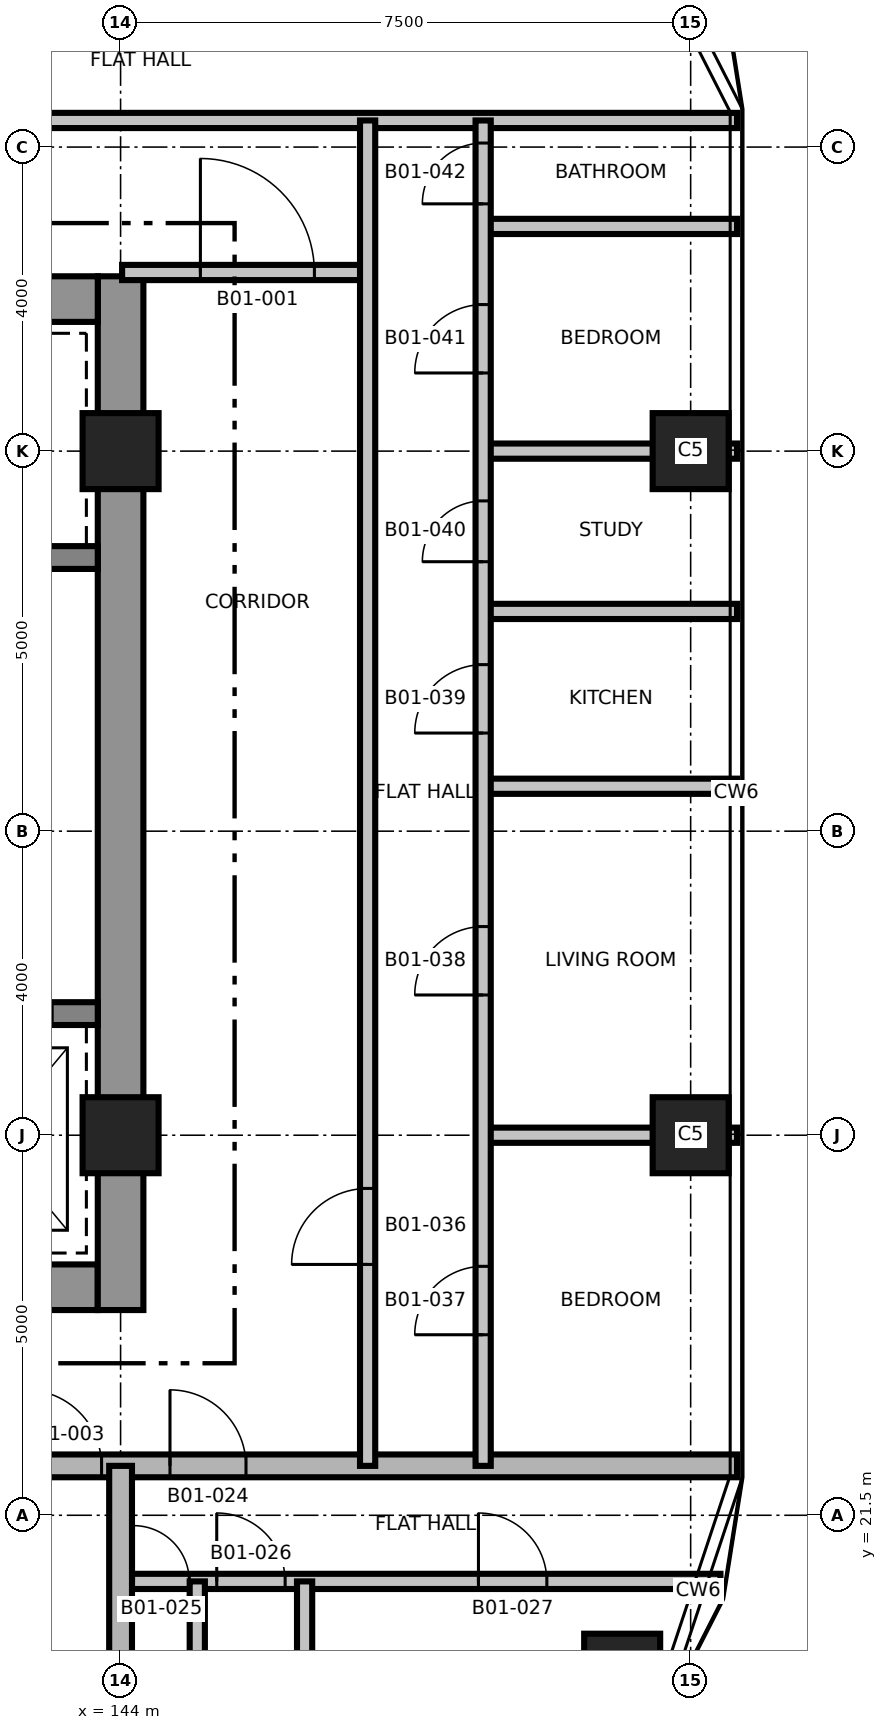
"""IFC4 building model, lengths in metres.
Left out: names, types, materials, properties, quantities, classifications, styles, units other than length and angle.
Written with IfcOpenShell. Run it as: python <this file> out.ifc"""

import sys

from ifc_helpers import new_model, si_unit, direction, frame, frame_2d, origin, origin_2d, place, context, subcontext, project, spatial, rectangle, extrude, element, fill, save


model = new_model("IFC4")
c1 = context("Model", 3, precision=1e-05, world=origin(), true_north=direction((0.0, 1.0)))
c2 = subcontext(c1, "Body", "Model", "MODEL_VIEW")
j1 = project(units=[si_unit("LENGTHUNIT", "METRE"), si_unit("PLANEANGLEUNIT", "RADIAN")], contexts=[c1])
p1 = place(None, origin())
s1 = spatial("IfcSite", under=j1, at=p1, CompositionType="ELEMENT")
p2 = place(p1, origin())
s2 = spatial("IfcBuilding", under=s1, at=p2, CompositionType="ELEMENT")
p3 = place(p2, frame((0.0, 0.0, 33.5)))
s3 = spatial("IfcBuildingStorey", under=s2, at=p3, CompositionType="ELEMENT", Elevation=33.5)
p4 = place(p3, frame((128.7, 24.5, 0.0), z_axis=(0.0, 0.0, 1.0), x_axis=(1.0, 0.0, 0.0)))
e1 = element("IfcWall", 1, at=p4, inside=s3, PredefinedType="SHEAR", context=c2, shape_type="SweptSolid", body=[
    extrude(rectangle(XDim=15.0, YDim=0.6, at=frame_2d((7.5, 0.0))), origin(), (0.0, 0.0, 1.0), 3.7),
])
p5 = place(p4, frame((9.65, 0.0, 0.0)))
e2 = element("IfcOpeningElement", 2, at=p5, cuts=e1, PredefinedType="OPENING", context=c2, shape_type="SweptSolid", body=[
    extrude(rectangle(XDim=1.5, YDim=2.1, at=frame_2d((0.75, 1.05))), frame((0.0, 0.31, 0.0), z_axis=(0.0, -1.0, 0.0), x_axis=(1.0, 0.0, 0.0)), (0.0, 0.0, 1.0), 0.62),
])
p6 = place(p4, frame((1.25, 0.0, 0.0)))
e3 = element("IfcOpeningElement", 3, at=p6, cuts=e1, PredefinedType="OPENING", context=c2, shape_type="SweptSolid", body=[
    extrude(rectangle(XDim=0.9, YDim=2.1, at=frame_2d((0.45, 1.05))), frame((0.0, 0.31, 0.0), z_axis=(0.0, -1.0, 0.0), x_axis=(1.0, 0.0, 0.0)), (0.0, 0.0, 1.0), 0.62),
])
p7 = place(p3, frame((144.0, 24.2, 0.0), z_axis=(0.0, 0.0, 1.0), x_axis=(0.0, 1.0, 0.0)))
e4 = element("IfcWall", 4, at=p7, inside=s3, PredefinedType="SHEAR", context=c2, shape_type="SweptSolid", body=[
    extrude(rectangle(XDim=13.6, YDim=0.6, at=frame_2d((6.8, 0.0))), origin(), (0.0, 0.0, 1.0), 3.7),
])
p8 = place(p3, frame((128.7, 37.5, 0.0), z_axis=(0.0, 0.0, 1.0), x_axis=(1.0, 0.0, 0.0)))
e5 = element("IfcWall", 5, at=p8, inside=s3, PredefinedType="SHEAR", context=c2, shape_type="SweptSolid", body=[
    extrude(rectangle(XDim=15.0, YDim=0.6, at=frame_2d((7.5, 0.0))), origin(), (0.0, 0.0, 1.0), 3.7),
])
p9 = place(p8, frame((9.65, 0.0, 0.0)))
e6 = element("IfcOpeningElement", 6, at=p9, cuts=e5, PredefinedType="OPENING", context=c2, shape_type="SweptSolid", body=[
    extrude(rectangle(XDim=1.5, YDim=2.1, at=frame_2d((0.75, 1.05))), frame((0.0, 0.31, 0.0), z_axis=(0.0, -1.0, 0.0), x_axis=(1.0, 0.0, 0.0)), (0.0, 0.0, 1.0), 0.62),
])
p10 = place(p8, frame((12.85, 0.0, 0.0)))
e7 = element("IfcOpeningElement", 7, at=p10, cuts=e5, PredefinedType="OPENING", context=c2, shape_type="SweptSolid", body=[
    extrude(rectangle(XDim=0.9, YDim=2.1, at=frame_2d((0.45, 1.05))), frame((0.0, 0.31, 0.0), z_axis=(0.0, -1.0, 0.0), x_axis=(1.0, 0.0, 0.0)), (0.0, 0.0, 1.0), 0.62),
])
p11 = place(p8, frame((4.3, 0.0, 0.0)))
e8 = element("IfcOpeningElement", 8, at=p11, cuts=e5, PredefinedType="OPENING", context=c2, shape_type="SweptSolid", body=[
    extrude(rectangle(XDim=0.9, YDim=2.1, at=frame_2d((0.45, 1.05))), frame((0.0, 0.31, 0.0), z_axis=(0.0, -1.0, 0.0), x_axis=(1.0, 0.0, 0.0)), (0.0, 0.0, 1.0), 0.62),
])
p12 = place(p8, frame((7.2, 0.0, 0.0)))
e9 = element("IfcOpeningElement", 9, at=p12, cuts=e5, PredefinedType="OPENING", context=c2, shape_type="SweptSolid", body=[
    extrude(rectangle(XDim=0.9, YDim=2.1, at=frame_2d((0.45, 1.05))), frame((0.0, 0.31, 0.0), z_axis=(0.0, -1.0, 0.0), x_axis=(1.0, 0.0, 0.0)), (0.0, 0.0, 1.0), 0.62),
])
p13 = place(p3, frame((141.05, 28.1, 0.0), z_axis=(0.0, 0.0, 1.0), x_axis=(1.0, 0.0, 0.0)))
e10 = element("IfcWall", 10, at=p13, inside=s3, PredefinedType="SHEAR", context=c2, shape_type="SweptSolid", body=[
    extrude(rectangle(XDim=2.65, YDim=0.3, at=frame_2d((1.325, 0.0))), origin(), (0.0, 0.0, 1.0), 3.7),
])
p14 = place(p13, frame((0.75, 0.0, 0.0)))
e11 = element("IfcOpeningElement", 11, at=p14, cuts=e10, PredefinedType="OPENING", context=c2, shape_type="SweptSolid", body=[
    extrude(rectangle(XDim=1.3, YDim=2.4, at=frame_2d((0.65, 1.2))), frame((0.0, 0.16, 0.0), z_axis=(0.0, -1.0, 0.0), x_axis=(1.0, 0.0, 0.0)), (0.0, 0.0, 1.0), 0.32),
])
p15 = place(p3, frame((141.05, 34.1, 0.0), z_axis=(0.0, 0.0, 1.0), x_axis=(1.0, 0.0, 0.0)))
e12 = element("IfcWall", 12, at=p15, inside=s3, PredefinedType="SHEAR", context=c2, shape_type="SweptSolid", body=[
    extrude(rectangle(XDim=2.65, YDim=0.3, at=frame_2d((1.325, 0.0))), origin(), (0.0, 0.0, 1.0), 3.7),
])
for number, where, z_axis, x_axis in (
    (13, (150.599, 19.442, 0.0), (0.0, 0.0, 1.0), (1.0, 0.0, 0.0)),
    (14, (144.0, 26.5, 0.0), (0.0, 0.0, 1.0), (1.0, 0.0, 0.0)),
    (15, (151.5, 26.5, 0.0), (0.0, 0.0, 1.0), (1.0, 0.0, 0.0)),
    (16, (144.0, 35.5, 0.0), (0.0, 0.0, 1.0), (1.0, 0.0, 0.0)),
    (17, (151.5, 35.5, 0.0), (0.0, 0.0, 1.0), (1.0, 0.0, 0.0)),
):
    element("IfcColumn", number, at=place(p3, frame(where, z_axis=z_axis, x_axis=x_axis)), inside=s3, PredefinedType="COLUMN", context=c2, shape_type="SweptSolid", body=[
        extrude(rectangle(XDim=1.0, YDim=1.0, at=origin_2d()), origin(), (0.0, 0.0, 1.0), 3.7),
    ])
p16 = place(p3, frame((144.0, 20.63, 0.0), z_axis=(0.0, 0.0, 1.0), x_axis=(1.0, 0.0, 0.0)))
e18 = element("IfcWall", 18, at=p16, inside=s3, PredefinedType="PARTITIONING", context=c2, shape_type="SweptSolid", body=[
    extrude(rectangle(XDim=7.892, YDim=0.2, at=frame_2d((3.946, 0.0))), origin(), (0.0, 0.0, 1.0), 3.4),
])
p17 = place(p16, frame((0.17, 0.0, 0.0)))
e19 = element("IfcOpeningElement", 19, at=p17, cuts=e18, PredefinedType="OPENING", context=c2, shape_type="SweptSolid", body=[
    extrude(rectangle(XDim=0.734, YDim=2.1, at=frame_2d((0.367, 1.05))), frame((0.0, 0.11, 0.0), z_axis=(0.0, -1.0, 0.0), x_axis=(1.0, 0.0, 0.0)), (0.0, 0.0, 1.0), 0.22),
])
p18 = place(p16, frame((1.265, 0.0, 0.0)))
e20 = element("IfcOpeningElement", 20, at=p18, cuts=e18, PredefinedType="OPENING", context=c2, shape_type="SweptSolid", body=[
    extrude(rectangle(XDim=0.9, YDim=2.1, at=frame_2d((0.45, 1.05))), frame((0.0, 0.11, 0.0), z_axis=(0.0, -1.0, 0.0), x_axis=(1.0, 0.0, 0.0)), (0.0, 0.0, 1.0), 0.22),
])
p19 = place(p16, frame((4.708, 0.0, 0.0)))
e21 = element("IfcOpeningElement", 21, at=p19, cuts=e18, PredefinedType="OPENING", context=c2, shape_type="SweptSolid", body=[
    extrude(rectangle(XDim=0.9, YDim=2.1, at=frame_2d((0.45, 1.05))), frame((0.0, 0.11, 0.0), z_axis=(0.0, -1.0, 0.0), x_axis=(1.0, 0.0, 0.0)), (0.0, 0.0, 1.0), 0.22),
])
p20 = place(p3, frame((120.89, 22.15, 0.0), z_axis=(0.0, 0.0, 1.0), x_axis=(1.0, 0.0, 0.0)))
e22 = element("IfcWall", 22, at=p20, inside=s3, PredefinedType="SHEAR", context=c2, shape_type="SweptSolid", body=[
    extrude(rectangle(XDim=31.22, YDim=0.3, at=frame_2d((15.61, 0.0))), origin(), (0.0, 0.0, 1.0), 3.4),
])
p21 = place(p20, frame((21.86, 0.0, 0.0)))
e23 = element("IfcOpeningElement", 23, at=p21, cuts=e22, PredefinedType="OPENING", context=c2, shape_type="SweptSolid", body=[
    extrude(rectangle(XDim=1.0, YDim=2.1, at=frame_2d((0.5, 1.05))), frame((0.0, 0.16, 0.0), z_axis=(0.0, -1.0, 0.0), x_axis=(1.0, 0.0, 0.0)), (0.0, 0.0, 1.0), 0.32),
])
p22 = place(p20, frame((6.46, 0.0, 0.0)))
e24 = element("IfcOpeningElement", 24, at=p22, cuts=e22, PredefinedType="OPENING", context=c2, shape_type="SweptSolid", body=[
    extrude(rectangle(XDim=1.0, YDim=2.1, at=frame_2d((0.5, 1.05))), frame((0.0, 0.16, 0.0), z_axis=(0.0, -1.0, 0.0), x_axis=(1.0, 0.0, 0.0)), (0.0, 0.0, 1.0), 0.32),
])
p23 = place(p20, frame((11.36, 0.0, 0.0)))
e25 = element("IfcOpeningElement", 25, at=p23, cuts=e22, PredefinedType="OPENING", context=c2, shape_type="SweptSolid", body=[
    extrude(rectangle(XDim=1.0, YDim=2.1, at=frame_2d((0.5, 1.05))), frame((0.0, 0.16, 0.0), z_axis=(0.0, -1.0, 0.0), x_axis=(1.0, 0.0, 0.0)), (0.0, 0.0, 1.0), 0.32),
])
p24 = place(p20, frame((23.76, 0.0, 0.0)))
e26 = element("IfcOpeningElement", 26, at=p24, cuts=e22, PredefinedType="OPENING", context=c2, shape_type="SweptSolid", body=[
    extrude(rectangle(XDim=1.0, YDim=2.1, at=frame_2d((0.5, 1.05))), frame((0.0, 0.16, 0.0), z_axis=(0.0, -1.0, 0.0), x_axis=(1.0, 0.0, 0.0)), (0.0, 0.0, 1.0), 0.32),
])
p25 = place(p20, frame((15.86, 0.0, 0.0)))
e27 = element("IfcOpeningElement", 27, at=p25, cuts=e22, PredefinedType="OPENING", context=c2, shape_type="SweptSolid", body=[
    extrude(rectangle(XDim=0.9, YDim=2.1, at=frame_2d((0.45, 1.05))), frame((0.0, 0.16, 0.0), z_axis=(0.0, -1.0, 0.0), x_axis=(1.0, 0.0, 0.0)), (0.0, 0.0, 1.0), 0.32),
])
for number, where, z_axis, x_axis in (
    (28, (148.77, 26.5, 0.0), (0.0, 0.0, 1.0), (1.0, 0.0, 0.0)),
    (29, (148.77, 31.091, 0.0), (0.0, 0.0, 1.0), (1.0, 0.0, 0.0)),
    (30, (148.77, 33.391, 0.0), (0.0, 0.0, 1.0), (1.0, 0.0, 0.0)),
    (31, (148.77, 35.5, 0.0), (0.0, 0.0, 1.0), (1.0, 0.0, 0.0)),
):
    element("IfcWall", number, at=place(p3, frame(where, z_axis=z_axis, x_axis=x_axis)), inside=s3, PredefinedType="PARTITIONING", context=c2, shape_type="SweptSolid", body=[
        extrude(rectangle(XDim=3.34, YDim=0.2, at=frame_2d((1.67, 0.0))), origin(), (0.0, 0.0, 1.0), 3.4),
    ])
p26 = place(p3, frame((144.02, 37.85, 0.0), z_axis=(0.0, 0.0, 1.0), x_axis=(1.0, 0.0, 0.0)))
e32 = element("IfcWall", 32, at=p26, inside=s3, PredefinedType="PARTITIONING", context=c2, shape_type="SweptSolid", body=[
    extrude(rectangle(XDim=3.23, YDim=0.2, at=frame_2d((1.615, 0.0))), origin(), (0.0, 0.0, 1.0), 3.4),
])
p27 = place(p26, frame((1.03, 0.0, 0.0)))
e33 = element("IfcOpeningElement", 33, at=p27, cuts=e32, PredefinedType="OPENING", context=c2, shape_type="SweptSolid", body=[
    extrude(rectangle(XDim=1.5, YDim=2.1, at=frame_2d((0.75, 1.05))), frame((0.0, 0.11, 0.0), z_axis=(0.0, -1.0, 0.0), x_axis=(1.0, 0.0, 0.0)), (0.0, 0.0, 1.0), 0.22),
])
p28 = place(p3, frame((148.77, 38.456, 0.0), z_axis=(0.0, 0.0, 1.0), x_axis=(1.0, 0.0, 0.0)))
e34 = element("IfcWall", 34, at=p28, inside=s3, PredefinedType="PARTITIONING", context=c2, shape_type="SweptSolid", body=[
    extrude(rectangle(XDim=3.34, YDim=0.2, at=frame_2d((1.67, 0.0))), origin(), (0.0, 0.0, 1.0), 3.4),
])
p29 = place(p3, frame((120.89, 39.85, 0.0), z_axis=(0.0, 0.0, 1.0), x_axis=(1.0, 0.0, 0.0)))
e35 = element("IfcWall", 35, at=p29, inside=s3, PredefinedType="PARTITIONING", context=c2, shape_type="SweptSolid", body=[
    extrude(rectangle(XDim=31.22, YDim=0.2, at=frame_2d((15.61, 0.0))), origin(), (0.0, 0.0, 1.0), 3.4),
])
p30 = place(p29, frame((10.21, 0.0, 0.0)))
e36 = element("IfcOpeningElement", 36, at=p30, cuts=e35, PredefinedType="OPENING", context=c2, shape_type="SweptSolid", body=[
    extrude(rectangle(XDim=1.0, YDim=2.1, at=frame_2d((0.5, 1.05))), frame((0.0, 0.11, 0.0), z_axis=(0.0, -1.0, 0.0), x_axis=(1.0, 0.0, 0.0)), (0.0, 0.0, 1.0), 0.22),
])
p31 = place(p29, frame((20.01, 0.0, 0.0)))
e37 = element("IfcOpeningElement", 37, at=p31, cuts=e35, PredefinedType="OPENING", context=c2, shape_type="SweptSolid", body=[
    extrude(rectangle(XDim=1.0, YDim=2.1, at=frame_2d((0.5, 1.05))), frame((0.0, 0.11, 0.0), z_axis=(0.0, -1.0, 0.0), x_axis=(1.0, 0.0, 0.0)), (0.0, 0.0, 1.0), 0.22),
])
p32 = place(p3, frame((144.0, 16.89, 0.0), z_axis=(0.0, 0.0, 1.0), x_axis=(0.0, 1.0, 0.0)))
e38 = element("IfcWall", 38, at=p32, inside=s3, PredefinedType="SHEAR", context=c2, shape_type="SweptSolid", body=[
    extrude(rectangle(XDim=5.26, YDim=0.3, at=frame_2d((2.63, 0.0))), origin(), (0.0, 0.0, 1.0), 3.4),
])
for number, where, z_axis, x_axis in (
    (39, (145.009, 16.89, 0.0), (0.0, 0.0, 1.0), (0.0, 1.0, 0.0)),
    (40, (146.421, 16.89, 0.0), (0.0, 0.0, 1.0), (0.0, 1.0, 0.0)),
):
    element("IfcWall", number, at=place(p3, frame(where, z_axis=z_axis, x_axis=x_axis)), inside=s3, PredefinedType="PARTITIONING", context=c2, shape_type="SweptSolid", body=[
        extrude(rectangle(XDim=3.74, YDim=0.2, at=frame_2d((1.87, 0.0))), origin(), (0.0, 0.0, 1.0), 3.4),
    ])
p33 = place(p3, frame((147.25, 22.15, 0.0), z_axis=(0.0, 0.0, 1.0), x_axis=(0.0, 1.0, 0.0)))
e41 = element("IfcWall", 41, at=p33, inside=s3, PredefinedType="PARTITIONING", context=c2, shape_type="SweptSolid", body=[
    extrude(rectangle(XDim=17.7, YDim=0.2, at=frame_2d((8.85, 0.0))), origin(), (0.0, 0.0, 1.0), 3.4),
])
p34 = place(p33, frame((2.65, 0.0, 0.0)))
e42 = element("IfcOpeningElement", 42, at=p34, cuts=e41, PredefinedType="OPENING", context=c2, shape_type="SweptSolid", body=[
    extrude(rectangle(XDim=1.0, YDim=2.1, at=frame_2d((0.5, 1.05))), frame((0.0, 0.11, 0.0), z_axis=(0.0, -1.0, 0.0), x_axis=(1.0, 0.0, 0.0)), (0.0, 0.0, 1.0), 0.22),
])
p35 = place(p3, frame((148.77, 22.15, 0.0), z_axis=(0.0, 0.0, 1.0), x_axis=(0.0, 1.0, 0.0)))
e43 = element("IfcWall", 43, at=p35, inside=s3, PredefinedType="PARTITIONING", context=c2, shape_type="SweptSolid", body=[
    extrude(rectangle(XDim=17.7, YDim=0.2, at=frame_2d((8.85, 0.0))), origin(), (0.0, 0.0, 1.0), 3.4),
])
p36 = place(p35, frame((1.725, 0.0, 0.0)))
e44 = element("IfcOpeningElement", 44, at=p36, cuts=e43, PredefinedType="OPENING", context=c2, shape_type="SweptSolid", body=[
    extrude(rectangle(XDim=0.9, YDim=2.1, at=frame_2d((0.45, 1.05))), frame((0.0, 0.11, 0.0), z_axis=(0.0, -1.0, 0.0), x_axis=(1.0, 0.0, 0.0)), (0.0, 0.0, 1.0), 0.22),
])
p37 = place(p35, frame((6.195, 0.0, 0.0)))
e45 = element("IfcOpeningElement", 45, at=p37, cuts=e43, PredefinedType="OPENING", context=c2, shape_type="SweptSolid", body=[
    extrude(rectangle(XDim=0.9, YDim=2.1, at=frame_2d((0.45, 1.05))), frame((0.0, 0.11, 0.0), z_axis=(0.0, -1.0, 0.0), x_axis=(1.0, 0.0, 0.0)), (0.0, 0.0, 1.0), 0.22),
])
p38 = place(p35, frame((9.641, 0.0, 0.0)))
e46 = element("IfcOpeningElement", 46, at=p38, cuts=e43, PredefinedType="OPENING", context=c2, shape_type="SweptSolid", body=[
    extrude(rectangle(XDim=0.9, YDim=2.1, at=frame_2d((0.45, 1.05))), frame((0.0, 0.11, 0.0), z_axis=(0.0, -1.0, 0.0), x_axis=(1.0, 0.0, 0.0)), (0.0, 0.0, 1.0), 0.22),
])
p39 = place(p35, frame((11.895, 0.0, 0.0)))
e47 = element("IfcOpeningElement", 47, at=p39, cuts=e43, PredefinedType="OPENING", context=c2, shape_type="SweptSolid", body=[
    extrude(rectangle(XDim=0.8, YDim=2.1, at=frame_2d((0.4, 1.05))), frame((0.0, 0.11, 0.0), z_axis=(0.0, -1.0, 0.0), x_axis=(1.0, 0.0, 0.0)), (0.0, 0.0, 1.0), 0.22),
])
p40 = place(p35, frame((14.378, 0.0, 0.0)))
e48 = element("IfcOpeningElement", 48, at=p40, cuts=e43, PredefinedType="OPENING", context=c2, shape_type="SweptSolid", body=[
    extrude(rectangle(XDim=0.9, YDim=2.1, at=frame_2d((0.45, 1.05))), frame((0.0, 0.11, 0.0), z_axis=(0.0, -1.0, 0.0), x_axis=(1.0, 0.0, 0.0)), (0.0, 0.0, 1.0), 0.22),
])
p41 = place(p35, frame((16.603, 0.0, 0.0)))
e49 = element("IfcOpeningElement", 49, at=p41, cuts=e43, PredefinedType="OPENING", context=c2, shape_type="SweptSolid", body=[
    extrude(rectangle(XDim=0.8, YDim=2.1, at=frame_2d((0.4, 1.05))), frame((0.0, 0.11, 0.0), z_axis=(0.0, -1.0, 0.0), x_axis=(1.0, 0.0, 0.0)), (0.0, 0.0, 1.0), 0.22),
])
p42 = place(p27, origin())
e50 = element("IfcDoor", 50, at=p42, inside=s3, OperationType="SINGLE_SWING_LEFT", PredefinedType="DOOR", context=c2, shape_type="SweptSolid", body=[
    extrude(rectangle(XDim=1.5, YDim=2.1, at=frame_2d((0.75, 1.05))), frame((0.0, 0.025, 0.0), z_axis=(0.0, -1.0, 0.0), x_axis=(1.0, 0.0, 0.0)), (0.0, 0.0, 1.0), 0.05),
])
fill(e33, e50)
p43 = place(p21, origin())
e51 = element("IfcDoor", 51, at=p43, inside=s3, OperationType="SINGLE_SWING_LEFT", PredefinedType="DOOR", context=c2, shape_type="SweptSolid", body=[
    extrude(rectangle(XDim=1.0, YDim=2.1, at=frame_2d((0.5, 1.05))), frame((0.0, 0.025, 0.0), z_axis=(0.0, -1.0, 0.0), x_axis=(1.0, 0.0, 0.0)), (0.0, 0.0, 1.0), 0.05),
])
fill(e23, e51)
p44 = place(p24, origin())
e52 = element("IfcDoor", 52, at=p44, inside=s3, OperationType="SINGLE_SWING_RIGHT", PredefinedType="DOOR", context=c2, shape_type="SweptSolid", body=[
    extrude(rectangle(XDim=1.0, YDim=2.1, at=frame_2d((0.5, 1.05))), frame((0.0, 0.025, 0.0), z_axis=(0.0, -1.0, 0.0), x_axis=(1.0, 0.0, 0.0)), (0.0, 0.0, 1.0), 0.05),
])
fill(e26, e52)
p45 = place(p17, origin())
e53 = element("IfcDoor", 53, at=p45, inside=s3, OperationType="SINGLE_SWING_LEFT", PredefinedType="DOOR", context=c2, shape_type="SweptSolid", body=[
    extrude(rectangle(XDim=0.734, YDim=2.1, at=frame_2d((0.367, 1.05))), frame((0.0, 0.025, 0.0), z_axis=(0.0, -1.0, 0.0), x_axis=(1.0, 0.0, 0.0)), (0.0, 0.0, 1.0), 0.05),
])
fill(e19, e53)
p46 = place(p18, origin())
e54 = element("IfcDoor", 54, at=p46, inside=s3, OperationType="SINGLE_SWING_RIGHT", PredefinedType="DOOR", context=c2, shape_type="SweptSolid", body=[
    extrude(rectangle(XDim=0.9, YDim=2.1, at=frame_2d((0.45, 1.05))), frame((0.0, 0.025, 0.0), z_axis=(0.0, -1.0, 0.0), x_axis=(1.0, 0.0, 0.0)), (0.0, 0.0, 1.0), 0.05),
])
fill(e20, e54)
p47 = place(p19, origin())
e55 = element("IfcDoor", 55, at=p47, inside=s3, OperationType="SINGLE_SWING_LEFT", PredefinedType="DOOR", context=c2, shape_type="SweptSolid", body=[
    extrude(rectangle(XDim=0.9, YDim=2.1, at=frame_2d((0.45, 1.05))), frame((0.0, 0.025, 0.0), z_axis=(0.0, -1.0, 0.0), x_axis=(1.0, 0.0, 0.0)), (0.0, 0.0, 1.0), 0.05),
])
fill(e21, e55)
p48 = place(p34, origin())
e56 = element("IfcDoor", 56, at=p48, inside=s3, OperationType="SINGLE_SWING_RIGHT", PredefinedType="DOOR", context=c2, shape_type="SweptSolid", body=[
    extrude(rectangle(XDim=1.0, YDim=2.1, at=frame_2d((0.5, 1.05))), frame((0.0, 0.025, 0.0), z_axis=(0.0, -1.0, 0.0), x_axis=(1.0, 0.0, 0.0)), (0.0, 0.0, 1.0), 0.05),
])
fill(e42, e56)
p49 = place(p36, origin())
e57 = element("IfcDoor", 57, at=p49, inside=s3, OperationType="SINGLE_SWING_LEFT", PredefinedType="DOOR", context=c2, shape_type="SweptSolid", body=[
    extrude(rectangle(XDim=0.9, YDim=2.1, at=frame_2d((0.45, 1.05))), frame((0.0, 0.025, 0.0), z_axis=(0.0, -1.0, 0.0), x_axis=(1.0, 0.0, 0.0)), (0.0, 0.0, 1.0), 0.05),
])
fill(e44, e57)
p50 = place(p37, origin())
e58 = element("IfcDoor", 58, at=p50, inside=s3, OperationType="SINGLE_SWING_RIGHT", PredefinedType="DOOR", context=c2, shape_type="SweptSolid", body=[
    extrude(rectangle(XDim=0.9, YDim=2.1, at=frame_2d((0.45, 1.05))), frame((0.0, 0.025, 0.0), z_axis=(0.0, -1.0, 0.0), x_axis=(1.0, 0.0, 0.0)), (0.0, 0.0, 1.0), 0.05),
])
fill(e45, e58)
p51 = place(p38, origin())
e59 = element("IfcDoor", 59, at=p51, inside=s3, OperationType="SINGLE_SWING_LEFT", PredefinedType="DOOR", context=c2, shape_type="SweptSolid", body=[
    extrude(rectangle(XDim=0.9, YDim=2.1, at=frame_2d((0.45, 1.05))), frame((0.0, 0.025, 0.0), z_axis=(0.0, -1.0, 0.0), x_axis=(1.0, 0.0, 0.0)), (0.0, 0.0, 1.0), 0.05),
])
fill(e46, e59)
p52 = place(p39, origin())
e60 = element("IfcDoor", 60, at=p52, inside=s3, OperationType="SINGLE_SWING_RIGHT", PredefinedType="DOOR", context=c2, shape_type="SweptSolid", body=[
    extrude(rectangle(XDim=0.8, YDim=2.1, at=frame_2d((0.4, 1.05))), frame((0.0, 0.025, 0.0), z_axis=(0.0, -1.0, 0.0), x_axis=(1.0, 0.0, 0.0)), (0.0, 0.0, 1.0), 0.05),
])
fill(e47, e60)
p53 = place(p40, origin())
e61 = element("IfcDoor", 61, at=p53, inside=s3, OperationType="SINGLE_SWING_LEFT", PredefinedType="DOOR", context=c2, shape_type="SweptSolid", body=[
    extrude(rectangle(XDim=0.9, YDim=2.1, at=frame_2d((0.45, 1.05))), frame((0.0, 0.025, 0.0), z_axis=(0.0, -1.0, 0.0), x_axis=(1.0, 0.0, 0.0)), (0.0, 0.0, 1.0), 0.05),
])
fill(e48, e61)
p54 = place(p41, origin())
e62 = element("IfcDoor", 62, at=p54, inside=s3, OperationType="SINGLE_SWING_RIGHT", PredefinedType="DOOR", context=c2, shape_type="SweptSolid", body=[
    extrude(rectangle(XDim=0.8, YDim=2.1, at=frame_2d((0.4, 1.05))), frame((0.0, 0.025, 0.0), z_axis=(0.0, -1.0, 0.0), x_axis=(1.0, 0.0, 0.0)), (0.0, 0.0, 1.0), 0.05),
])
fill(e49, e62)
save(model, sys.argv[1])
